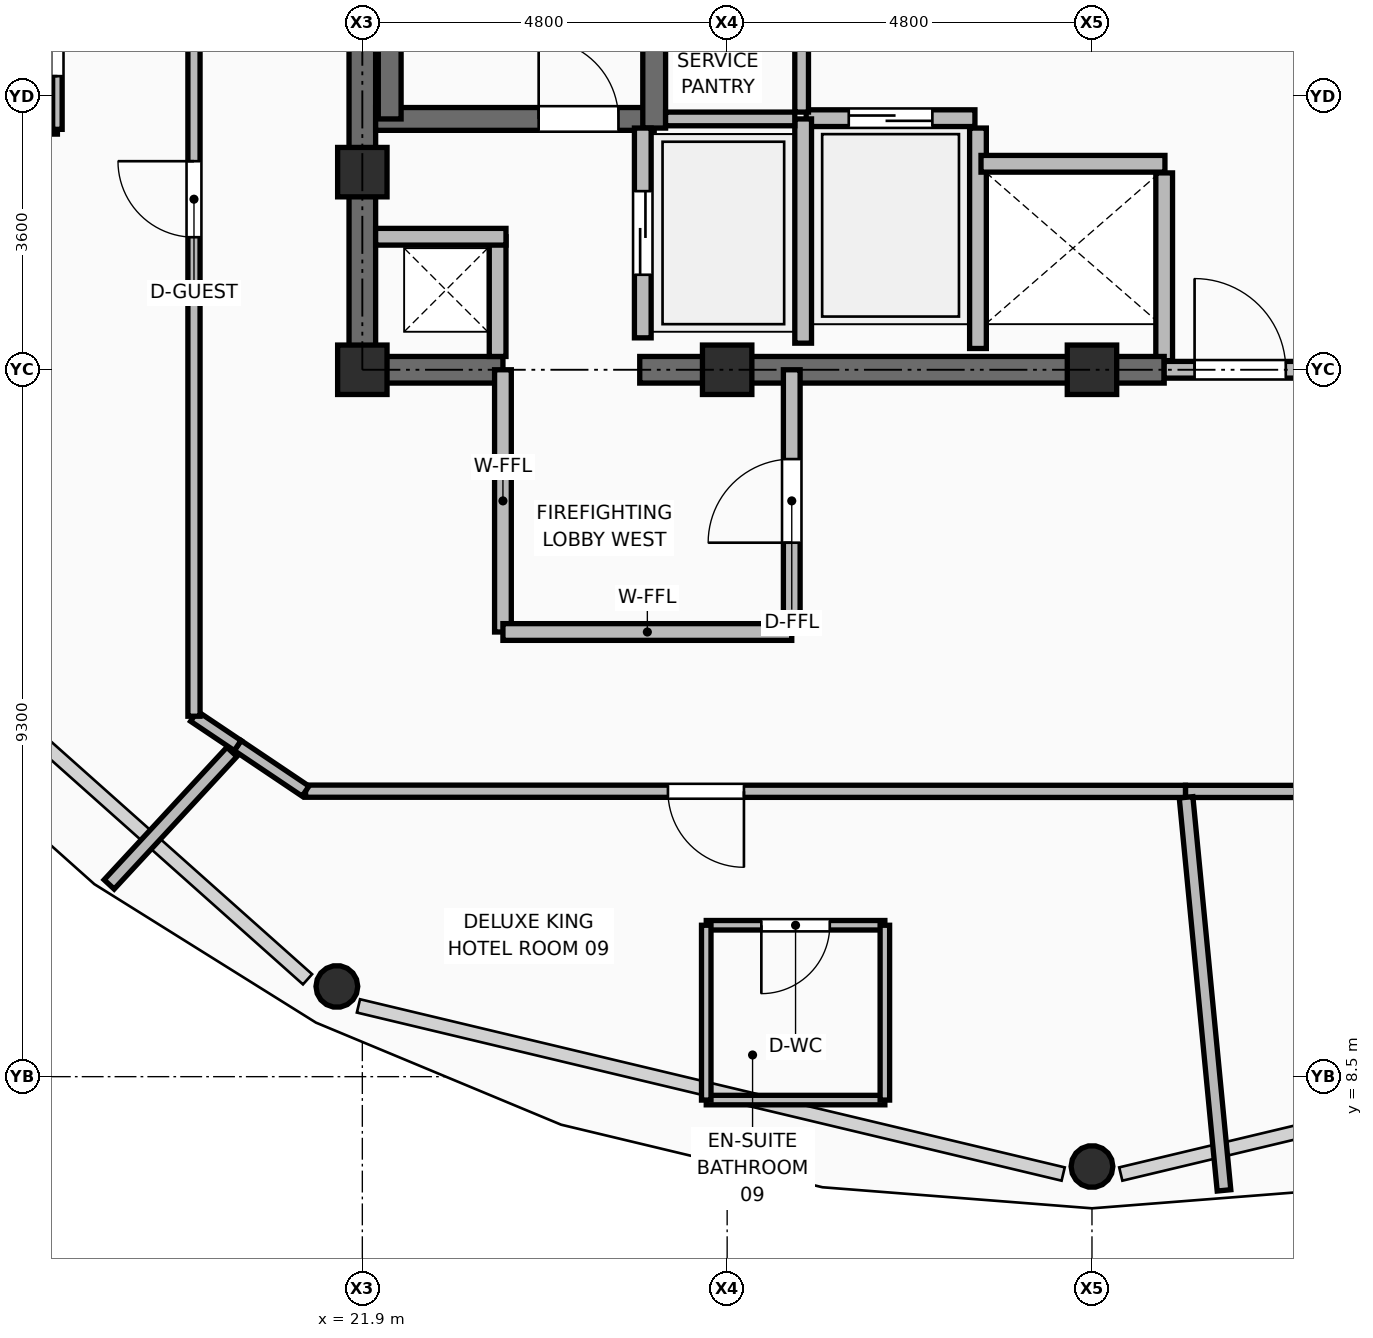
"""IFC4 building model, lengths in metres.
Left out: names, types, materials, properties, quantities, classifications, styles, units other than length and angle.
Written with IfcOpenShell. Run it as: python <this file> out.ifc"""

import sys

from ifc_helpers import new_model, si_unit, direction, frame, frame_2d, origin, origin_2d, place, context, subcontext, project, spatial, rectangle, hollow_circle, extrude, element, fill, save


model = new_model("IFC4")
c1 = context("Model", 3, precision=1e-05, world=origin(), true_north=direction((0.0, 1.0)))
c2 = subcontext(c1, "Body", "Model", "MODEL_VIEW")
j1 = project(units=[si_unit("LENGTHUNIT", "METRE"), si_unit("PLANEANGLEUNIT", "RADIAN")], contexts=[c1])
p1 = place(None, origin())
s1 = spatial("IfcSite", under=j1, at=p1, CompositionType="ELEMENT")
p2 = place(p1, origin())
s2 = spatial("IfcBuilding", under=s1, at=p2, CompositionType="ELEMENT")
p3 = place(p2, frame((0.0, 0.0, 263.85)))
s3 = spatial("IfcBuildingStorey", under=s2, at=p3, CompositionType="ELEMENT", Elevation=263.85)
for number, where, z_axis, x_axis in (
    (1, (21.9, 17.8, 0.0), (0.0, 0.0, 1.0), (1.0, 0.0, 0.0)),
    (2, (26.7, 17.8, 0.0), (0.0, 0.0, 1.0), (1.0, 0.0, 0.0)),
    (3, (31.5, 17.8, 0.0), (0.0, 0.0, 1.0), (1.0, 0.0, 0.0)),
    (4, (21.9, 20.4, 0.0), (0.0, 0.0, 1.0), (1.0, 0.0, 0.0)),
):
    element("IfcColumn", number, at=place(p3, frame(where, z_axis=z_axis, x_axis=x_axis)), inside=s3, PredefinedType="COLUMN", context=c2, shape_type="SweptSolid", body=[
        extrude(rectangle(XDim=0.65, YDim=0.65, at=origin_2d()), origin(), (0.0, 0.0, 1.0), 3.75),
    ])
for number, where, z_axis, x_axis in (
    (5, (21.565, 9.687, 0.0), (0.011, 0.017, 1.0), (-0.836, 0.549, 0.0)),
    (6, (31.5, 7.318, 0.0), (0.0, 0.02, 1.0), (-1.0, 0.0, 0.0)),
):
    element("IfcColumn", number, at=place(p3, frame(where, z_axis=z_axis, x_axis=x_axis)), inside=s3, PredefinedType="COLUMN", context=c2, shape_type="SweptSolid", body=[
        extrude(hollow_circle(Radius=0.275, WallThickness=0.025, at=origin_2d()), origin(), (0.0, 0.0, 1.0), 3.571),
    ])
p4 = place(p3, frame((30.0, 18.08, 0.0), z_axis=(0.0, 0.0, 1.0), x_axis=(0.0, 1.0, 0.0)))
e7 = element("IfcWall", 7, at=p4, inside=s3, PredefinedType="PARTITIONING", context=c2, shape_type="SweptSolid", body=[
    extrude(rectangle(XDim=2.9, YDim=0.22, at=frame_2d((1.45, 0.0))), origin(), (0.0, 0.0, 1.0), 3.545),
])
p5 = place(p3, frame((32.45, 17.92, 0.0), z_axis=(0.0, 0.0, 1.0), x_axis=(0.0, 1.0, 0.0)))
e8 = element("IfcWall", 8, at=p5, inside=s3, PredefinedType="PARTITIONING", context=c2, shape_type="SweptSolid", body=[
    extrude(rectangle(XDim=2.47, YDim=0.22, at=frame_2d((1.235, 0.0))), origin(), (0.0, 0.0, 1.0), 3.545),
])
p6 = place(p3, frame((21.725, 17.8, 0.0), z_axis=(0.0, 0.0, 1.0), x_axis=(1.0, 0.0, 0.0)))
e9 = element("IfcWall", 9, at=p6, inside=s3, PredefinedType="SHEAR", context=c2, shape_type="SweptSolid", body=[
    extrude(rectangle(XDim=2.025, YDim=0.35, at=frame_2d((1.012, 0.0))), origin(), (0.0, 0.0, 1.0), 3.57),
])
p7 = place(p3, frame((25.55, 17.8, 0.0), z_axis=(0.0, 0.0, 1.0), x_axis=(1.0, 0.0, 0.0)))
e10 = element("IfcWall", 10, at=p7, inside=s3, PredefinedType="SHEAR", context=c2, shape_type="SweptSolid", body=[
    extrude(rectangle(XDim=6.9, YDim=0.35, at=frame_2d((3.45, 0.0))), origin(), (0.0, 0.0, 1.0), 3.57),
])
p8 = place(p3, frame((32.45, 17.8, 0.0), z_axis=(0.0, 0.0, 1.0), x_axis=(1.0, 0.0, 0.0)))
e11 = element("IfcWall", 11, at=p8, inside=s3, PredefinedType="PARTITIONING", context=c2, shape_type="SweptSolid", body=[
    extrude(rectangle(XDim=2.5, YDim=0.22, at=frame_2d((1.25, 0.0))), origin(), (0.0, 0.0, 1.0), 3.132),
])
p9 = place(p8, frame((0.4, 0.0, 0.0)))
e12 = element("IfcOpeningElement", 12, at=p9, cuts=e11, PredefinedType="OPENING", context=c2, shape_type="SweptSolid", body=[
    extrude(rectangle(XDim=1.2, YDim=2.1, at=frame_2d((0.6, 1.05))), frame((0.0, 0.12, 0.0), z_axis=(0.0, -1.0, 0.0), x_axis=(1.0, 0.0, 0.0)), (0.0, 0.0, 1.0), 0.24),
])
p10 = place(p3, frame((21.9, 17.975, 0.0), z_axis=(0.0, 0.0, 1.0), x_axis=(0.0, 1.0, 0.0)))
e13 = element("IfcWall", 13, at=p10, inside=s3, PredefinedType="SHEAR", context=c2, shape_type="SweptSolid", body=[
    extrude(rectangle(XDim=14.3, YDim=0.35, at=frame_2d((7.15, 0.0))), origin(), (0.0, 0.0, 1.0), 3.57),
])
p11 = place(p3, frame((22.075, 21.1, 0.0), z_axis=(0.0, 0.0, 1.0), x_axis=(1.0, 0.0, 0.0)))
e14 = element("IfcWall", 14, at=p11, inside=s3, PredefinedType="SHEAR", context=c2, shape_type="SweptSolid", body=[
    extrude(rectangle(XDim=3.665, YDim=0.3, at=frame_2d((1.833, 0.0))), origin(), (0.0, 0.0, 1.0), 3.57),
])
p12 = place(p11, frame((2.145, 0.0, 0.0)))
e15 = element("IfcOpeningElement", 15, at=p12, cuts=e14, PredefinedType="OPENING", context=c2, shape_type="SweptSolid", body=[
    extrude(rectangle(XDim=1.05, YDim=2.1, at=frame_2d((0.525, 1.05))), frame((0.0, 0.16, 0.0), z_axis=(0.0, -1.0, 0.0), x_axis=(1.0, 0.0, 0.0)), (0.0, 0.0, 1.0), 0.32),
])
p13 = place(p3, frame((25.74, 20.98, 0.0), z_axis=(0.0, 0.0, 1.0), x_axis=(0.0, 1.0, 0.0)))
e16 = element("IfcWall", 16, at=p13, inside=s3, PredefinedType="SHEAR", context=c2, shape_type="SweptSolid", body=[
    extrude(rectangle(XDim=7.99, YDim=0.3, at=frame_2d((3.995, 0.0))), origin(), (0.0, 0.0, 1.0), 3.57),
])
p14 = place(p3, frame((22.26, 21.1, 0.0), z_axis=(0.0, 0.0, 1.0), x_axis=(0.0, 1.0, 0.0)))
e17 = element("IfcWall", 17, at=p14, inside=s3, PredefinedType="SHEAR", context=c2, shape_type="SweptSolid", body=[
    extrude(rectangle(XDim=7.75, YDim=0.3, at=frame_2d((3.875, 0.0))), origin(), (0.0, 0.0, 1.0), 3.57),
])
p15 = place(p3, frame((23.68, 17.975, 0.0), z_axis=(0.0, 0.0, 1.0), x_axis=(0.0, 1.0, 0.0)))
e18 = element("IfcWall", 18, at=p15, inside=s3, PredefinedType="PARTITIONING", context=c2, shape_type="SweptSolid", body=[
    extrude(rectangle(XDim=1.575, YDim=0.22, at=frame_2d((0.788, 0.0))), origin(), (0.0, 0.0, 1.0), 3.132),
])
p16 = place(p3, frame((22.075, 19.55, 0.0), z_axis=(0.0, 0.0, 1.0), x_axis=(1.0, 0.0, 0.0)))
e19 = element("IfcWall", 19, at=p16, inside=s3, PredefinedType="PARTITIONING", context=c2, shape_type="SweptSolid", body=[
    extrude(rectangle(XDim=1.715, YDim=0.22, at=frame_2d((0.857, 0.0))), origin(), (0.0, 0.0, 1.0), 2.595),
])
p17 = place(p3, frame((25.59, 18.22, 0.0), z_axis=(0.0, 0.0, 1.0), x_axis=(0.0, 1.0, 0.0)))
e20 = element("IfcWall", 20, at=p17, inside=s3, PredefinedType="PARTITIONING", context=c2, shape_type="SweptSolid", body=[
    extrude(rectangle(XDim=2.76, YDim=0.22, at=frame_2d((1.38, 0.0))), origin(), (0.0, 0.0, 1.0), 3.55),
])
p18 = place(p17, frame((0.83, 0.0, 0.0)))
e21 = element("IfcOpeningElement", 21, at=p18, cuts=e20, PredefinedType="OPENING", context=c2, shape_type="SweptSolid", body=[
    extrude(rectangle(XDim=1.1, YDim=2.2, at=frame_2d((0.55, 1.1))), frame((0.0, 0.12, 0.0), z_axis=(0.0, -1.0, 0.0), x_axis=(1.0, 0.0, 0.0)), (0.0, 0.0, 1.0), 0.24),
])
p19 = place(p3, frame((27.74, 21.11, 0.0), z_axis=(0.0, 0.0, 1.0), x_axis=(1.0, 0.0, 0.0)))
e22 = element("IfcWall", 22, at=p19, inside=s3, PredefinedType="PARTITIONING", context=c2, shape_type="SweptSolid", body=[
    extrude(rectangle(XDim=2.22, YDim=0.22, at=frame_2d((1.11, 0.0))), origin(), (0.0, 0.0, 1.0), 3.55),
])
p20 = place(p19, frame((0.56, 0.0, 0.0)))
e23 = element("IfcOpeningElement", 23, at=p20, cuts=e22, PredefinedType="OPENING", context=c2, shape_type="SweptSolid", body=[
    extrude(rectangle(XDim=1.1, YDim=2.2, at=frame_2d((0.55, 1.1))), frame((0.0, 0.12, 0.0), z_axis=(0.0, -1.0, 0.0), x_axis=(1.0, 0.0, 0.0)), (0.0, 0.0, 1.0), 0.24),
])
p21 = place(p3, frame((30.04, 20.51, 0.0), z_axis=(0.0, 0.0, 1.0), x_axis=(1.0, 0.0, 0.0)))
e24 = element("IfcWall", 24, at=p21, inside=s3, PredefinedType="PARTITIONING", context=c2, shape_type="SweptSolid", body=[
    extrude(rectangle(XDim=2.42, YDim=0.22, at=frame_2d((1.21, 0.0))), origin(), (0.0, 0.0, 1.0), 3.55),
])
p22 = place(p3, frame((27.7, 18.15, 0.0), z_axis=(0.0, 0.0, 1.0), x_axis=(0.0, 1.0, 0.0)))
e25 = element("IfcWall", 25, at=p22, inside=s3, PredefinedType="PARTITIONING", context=c2, shape_type="SweptSolid", body=[
    extrude(rectangle(XDim=2.95, YDim=0.22, at=frame_2d((1.475, 0.0))), origin(), (0.0, 0.0, 1.0), 3.55),
])
p23 = place(p3, frame((25.89, 21.1, 0.0), z_axis=(0.0, 0.0, 1.0), x_axis=(1.0, 0.0, 0.0)))
e26 = element("IfcWall", 26, at=p23, inside=s3, PredefinedType="PARTITIONING", context=c2, shape_type="SweptSolid", body=[
    extrude(rectangle(XDim=1.7, YDim=0.18, at=frame_2d((0.85, 0.0))), origin(), (0.0, 0.0, 1.0), 3.55),
])
p24 = place(p3, frame((27.68, 21.19, 0.0), z_axis=(0.0, 0.0, 1.0), x_axis=(0.0, 1.0, 0.0)))
e27 = element("IfcWall", 27, at=p24, inside=s3, PredefinedType="PARTITIONING", context=c2, shape_type="SweptSolid", body=[
    extrude(rectangle(XDim=4.37, YDim=0.18, at=frame_2d((2.185, 0.0))), origin(), (0.0, 0.0, 1.0), 3.55),
])
p25 = place(p24, frame((1.735, 0.0, 0.0)))
e28 = element("IfcOpeningElement", 28, at=p25, cuts=e27, PredefinedType="OPENING", context=c2, shape_type="SweptSolid", body=[
    extrude(rectangle(XDim=0.9, YDim=2.1, at=frame_2d((0.45, 1.05))), frame((0.0, 0.1, 0.0), z_axis=(0.0, -1.0, 0.0), x_axis=(1.0, 0.0, 0.0)), (0.0, 0.0, 1.0), 0.2),
])
p26 = place(p3, frame((23.75, 14.35, 0.0), z_axis=(0.0, 0.0, 1.0), x_axis=(0.0, 1.0, 0.0)))
e29 = element("IfcWall", 29, at=p26, inside=s3, PredefinedType="PARTITIONING", context=c2, shape_type="SweptSolid", body=[
    extrude(rectangle(XDim=3.45, YDim=0.22, at=frame_2d((1.725, 0.0))), origin(), (0.0, 0.0, 1.0), 3.132),
])
p27 = place(p3, frame((23.75, 14.35, 0.0), z_axis=(0.0, 0.0, 1.0), x_axis=(1.0, 0.0, 0.0)))
e30 = element("IfcWall", 30, at=p27, inside=s3, PredefinedType="PARTITIONING", context=c2, shape_type="SweptSolid", body=[
    extrude(rectangle(XDim=3.8, YDim=0.22, at=frame_2d((1.9, 0.0))), origin(), (0.0, 0.0, 1.0), 3.55),
])
p28 = place(p3, frame((27.55, 14.35, 0.0), z_axis=(0.0, 0.0, 1.0), x_axis=(0.0, 1.0, 0.0)))
e31 = element("IfcWall", 31, at=p28, inside=s3, PredefinedType="PARTITIONING", context=c2, shape_type="SweptSolid", body=[
    extrude(rectangle(XDim=3.45, YDim=0.22, at=frame_2d((1.725, 0.0))), origin(), (0.0, 0.0, 1.0), 3.132),
])
p29 = place(p28, frame((1.175, 0.0, 0.0)))
e32 = element("IfcOpeningElement", 32, at=p29, cuts=e31, PredefinedType="OPENING", context=c2, shape_type="SweptSolid", body=[
    extrude(rectangle(XDim=1.1, YDim=2.1, at=frame_2d((0.55, 1.05))), frame((0.0, 0.12, 0.0), z_axis=(0.0, -1.0, 0.0), x_axis=(1.0, 0.0, 0.0)), (0.0, 0.0, 1.0), 0.24),
])
p30 = place(p3, frame((41.825, 12.25, 0.0), z_axis=(0.0, 0.0, 1.0), x_axis=(-0.999999948119, 0.000322121692, 0.0)))
e33 = element("IfcWall", 33, at=p30, inside=s3, PredefinedType="PARTITIONING", context=c2, shape_type="SweptSolid", body=[
    extrude(rectangle(XDim=9.095, YDim=0.16, at=frame_2d((4.547, 0.0))), origin(), (0.0, 0.0, 1.0), 3.132),
])
p31 = place(p30, frame((2.388, 0.0, 0.0)))
e34 = element("IfcOpeningElement", 34, at=p31, cuts=e33, PredefinedType="OPENING", context=c2, shape_type="SweptSolid", body=[
    extrude(rectangle(XDim=1.2, YDim=2.1, at=frame_2d((0.6, 1.05))), frame((0.0, 0.09, 0.0), z_axis=(0.0, -1.0, 0.0), x_axis=(1.0, 0.0, 0.0)), (0.0, 0.0, 1.0), 0.18),
])
p32 = place(p3, frame((32.73, 12.253, 0.0), z_axis=(0.0, 0.0, 1.0), x_axis=(-0.99999996242, 0.000274151701, 0.0)))
e35 = element("IfcWall", 35, at=p32, inside=s3, PredefinedType="PARTITIONING", context=c2, shape_type="SweptSolid", body=[
    extrude(rectangle(XDim=11.577, YDim=0.16, at=frame_2d((5.789, 0.0))), origin(), (0.0, 0.0, 1.0), 3.132),
])
p33 = place(p32, frame((5.809, 0.0, 0.0)))
e36 = element("IfcOpeningElement", 36, at=p33, cuts=e35, PredefinedType="OPENING", context=c2, shape_type="SweptSolid", body=[
    extrude(rectangle(XDim=1.0, YDim=2.1, at=frame_2d((0.5, 1.05))), frame((0.0, 0.09, 0.0), z_axis=(0.0, -1.0, 0.0), x_axis=(1.0, 0.0, 0.0)), (0.0, 0.0, 1.0), 0.18),
])
p34 = place(p3, frame((21.153, 12.256, 0.0), z_axis=(0.0, 0.0, 1.0), x_axis=(-0.830125096925, 0.557577190581, 0.0)))
e37 = element("IfcWall", 37, at=p34, inside=s3, PredefinedType="PARTITIONING", context=c2, shape_type="SweptSolid", body=[
    extrude(rectangle(XDim=1.076, YDim=0.16, at=frame_2d((0.538, 0.0))), origin(), (0.0, 0.0, 1.0), 3.55),
])
p35 = place(p3, frame((20.26, 12.856, 0.0), z_axis=(0.0, 0.0, 1.0), x_axis=(-0.8302560917, 0.557382115065, 0.0)))
e38 = element("IfcWall", 38, at=p35, inside=s3, PredefinedType="PARTITIONING", context=c2, shape_type="SweptSolid", body=[
    extrude(rectangle(XDim=0.692, YDim=0.16, at=frame_2d((0.346, 0.0))), origin(), (0.0, 0.0, 1.0), 3.55),
])
p36 = place(p3, frame((19.685, 13.242, 0.0), z_axis=(0.0, 0.0, 1.0), x_axis=(0.0, 1.0, 0.0)))
e39 = element("IfcWall", 39, at=p36, inside=s3, PredefinedType="PARTITIONING", context=c2, shape_type="SweptSolid", body=[
    extrude(rectangle(XDim=10.608, YDim=0.16, at=frame_2d((5.304, 0.0))), origin(), (0.0, 0.0, 1.0), 3.132),
])
p37 = place(p36, frame((6.302, 0.0, 0.0)))
e40 = element("IfcOpeningElement", 40, at=p37, cuts=e39, PredefinedType="OPENING", context=c2, shape_type="SweptSolid", body=[
    extrude(rectangle(XDim=1.0, YDim=2.1, at=frame_2d((0.5, 1.05))), frame((0.0, 0.09, 0.0), z_axis=(0.0, -1.0, 0.0), x_axis=(1.0, 0.0, 0.0)), (0.0, 0.0, 1.0), 0.18),
])
p38 = place(p3, frame((20.184, 12.773, 0.0), z_axis=(0.0, 0.0, 1.0), x_axis=(-0.679469476933, -0.733703775318, 0.0)))
e41 = element("IfcWall", 41, at=p38, inside=s3, PredefinedType="PARTITIONING", context=c2, shape_type="SweptSolid", body=[
    extrude(rectangle(XDim=2.377, YDim=0.18, at=frame_2d((1.188, 0.0))), origin(), (0.0, 0.0, 1.0), 3.003),
])
p39 = place(p3, frame((32.738, 12.175, 0.0), z_axis=(0.0, 0.0, 1.0), x_axis=(0.096055357657, -0.995375993414, 0.0)))
e42 = element("IfcWall", 42, at=p39, inside=s3, PredefinedType="PARTITIONING", context=c2, shape_type="SweptSolid", body=[
    extrude(rectangle(XDim=5.195, YDim=0.18, at=frame_2d((2.598, 0.0))), origin(), (0.0, 0.0, 1.0), 3.003),
])
p40 = place(p3, frame((15.538, 20.963, 0.0), z_axis=(0.0, 0.0, 1.0), x_axis=(1.0, 0.0, 0.0)))
e43 = element("IfcWall", 43, at=p40, inside=s3, PredefinedType="PARTITIONING", context=c2, shape_type="SweptSolid", body=[
    extrude(rectangle(XDim=2.35, YDim=0.125, at=frame_2d((1.175, 0.0))), origin(), (0.0, 0.0, 1.0), 3.55),
])
p41 = place(p3, frame((17.888, 20.963, 0.0), z_axis=(0.0, 0.0, 1.0), x_axis=(0.0, 1.0, 0.0)))
e44 = element("IfcWall", 44, at=p41, inside=s3, PredefinedType="PARTITIONING", context=c2, shape_type="SweptSolid", body=[
    extrude(rectangle(XDim=2.3, YDim=0.125, at=frame_2d((1.15, 0.0))), origin(), (0.0, 0.0, 1.0), 3.132),
])
p42 = place(p41, frame((0.7, 0.0, 0.0)))
e45 = element("IfcOpeningElement", 45, at=p42, cuts=e44, PredefinedType="OPENING", context=c2, shape_type="SweptSolid", body=[
    extrude(rectangle(XDim=0.9, YDim=2.1, at=frame_2d((0.45, 1.05))), frame((0.0, 0.073, 0.0), z_axis=(0.0, -1.0, 0.0), x_axis=(1.0, 0.0, 0.0)), (0.0, 0.0, 1.0), 0.145),
])
p43 = place(p3, frame((26.425, 8.192, 0.0), z_axis=(0.0, 0.0, 1.0), x_axis=(1.0, 0.0, 0.0)))
e46 = element("IfcWall", 46, at=p43, inside=s3, PredefinedType="PARTITIONING", context=c2, shape_type="SweptSolid", body=[
    extrude(rectangle(XDim=2.35, YDim=0.125, at=frame_2d((1.175, 0.0))), origin(), (0.0, 0.0, 1.0), 3.003),
])
p44 = place(p3, frame((26.425, 10.492, 0.0), z_axis=(0.0, 0.0, 1.0), x_axis=(1.0, 0.0, 0.0)))
e47 = element("IfcWall", 47, at=p44, inside=s3, PredefinedType="PARTITIONING", context=c2, shape_type="SweptSolid", body=[
    extrude(rectangle(XDim=2.35, YDim=0.125, at=frame_2d((1.175, 0.0))), origin(), (0.0, 0.0, 1.0), 3.55),
])
p45 = place(p44, frame((0.725, 0.0, 0.0)))
e48 = element("IfcOpeningElement", 48, at=p45, cuts=e47, PredefinedType="OPENING", context=c2, shape_type="SweptSolid", body=[
    extrude(rectangle(XDim=0.9, YDim=2.1, at=frame_2d((0.45, 1.05))), frame((0.0, 0.073, 0.0), z_axis=(0.0, -1.0, 0.0), x_axis=(1.0, 0.0, 0.0)), (0.0, 0.0, 1.0), 0.145),
])
for number, where, z_axis, x_axis in (
    (49, (26.425, 8.192, 0.0), (0.0, 0.0, 1.0), (0.0, 1.0, 0.0)),
    (50, (28.775, 8.192, 0.0), (0.0, 0.0, 1.0), (0.0, 1.0, 0.0)),
):
    element("IfcWall", number, at=place(p3, frame(where, z_axis=z_axis, x_axis=x_axis)), inside=s3, PredefinedType="PARTITIONING", context=c2, shape_type="SweptSolid", body=[
        extrude(rectangle(XDim=2.3, YDim=0.125, at=frame_2d((1.15, 0.0))), origin(), (0.0, 0.0, 1.0), 3.003),
    ])
p46 = place(p9, origin())
e51 = element("IfcDoor", 51, at=p46, inside=s3, OperationType="SINGLE_SWING_LEFT", PredefinedType="DOOR", context=c2, shape_type="SweptSolid", body=[
    extrude(rectangle(XDim=1.2, YDim=2.1, at=frame_2d((0.6, 1.05))), frame((0.0, 0.025, 0.0), z_axis=(0.0, -1.0, 0.0), x_axis=(1.0, 0.0, 0.0)), (0.0, 0.0, 1.0), 0.05),
])
fill(e12, e51)
p47 = place(p12, origin())
e52 = element("IfcDoor", 52, at=p47, inside=s3, OperationType="SINGLE_SWING_LEFT", PredefinedType="DOOR", context=c2, shape_type="SweptSolid", body=[
    extrude(rectangle(XDim=1.05, YDim=2.1, at=frame_2d((0.525, 1.05))), frame((0.0, 0.025, 0.0), z_axis=(0.0, -1.0, 0.0), x_axis=(1.0, 0.0, 0.0)), (0.0, 0.0, 1.0), 0.05),
])
fill(e15, e52)
p48 = place(p18, origin())
e53 = element("IfcDoor", 53, at=p48, inside=s3, OperationType="DOUBLE_DOOR_SLIDING", PredefinedType="DOOR", context=c2, shape_type="SweptSolid", body=[
    extrude(rectangle(XDim=1.1, YDim=2.2, at=frame_2d((0.55, 1.1))), frame((0.0, 0.025, 0.0), z_axis=(0.0, -1.0, 0.0), x_axis=(1.0, 0.0, 0.0)), (0.0, 0.0, 1.0), 0.05),
])
fill(e21, e53)
p49 = place(p20, origin())
e54 = element("IfcDoor", 54, at=p49, inside=s3, OperationType="DOUBLE_DOOR_SLIDING", PredefinedType="DOOR", context=c2, shape_type="SweptSolid", body=[
    extrude(rectangle(XDim=1.1, YDim=2.2, at=frame_2d((0.55, 1.1))), frame((0.0, 0.025, 0.0), z_axis=(0.0, -1.0, 0.0), x_axis=(1.0, 0.0, 0.0)), (0.0, 0.0, 1.0), 0.05),
])
fill(e23, e54)
p50 = place(p29, origin())
e55 = element("IfcDoor", 55, at=p50, inside=s3, OperationType="SINGLE_SWING_LEFT", PredefinedType="DOOR", context=c2, shape_type="SweptSolid", body=[
    extrude(rectangle(XDim=1.1, YDim=2.1, at=frame_2d((0.55, 1.05))), frame((0.0, 0.025, 0.0), z_axis=(0.0, -1.0, 0.0), x_axis=(1.0, 0.0, 0.0)), (0.0, 0.0, 1.0), 0.05),
])
fill(e32, e55)
p51 = place(p42, origin())
e56 = element("IfcDoor", 56, at=p51, inside=s3, OperationType="SINGLE_SWING_LEFT", PredefinedType="DOOR", context=c2, shape_type="SweptSolid", body=[
    extrude(rectangle(XDim=0.9, YDim=2.1, at=frame_2d((0.45, 1.05))), frame((0.0, 0.025, 0.0), z_axis=(0.0, -1.0, 0.0), x_axis=(1.0, 0.0, 0.0)), (0.0, 0.0, 1.0), 0.05),
])
fill(e45, e56)
p52 = place(p37, origin())
e57 = element("IfcDoor", 57, at=p52, inside=s3, OperationType="SINGLE_SWING_RIGHT", PredefinedType="DOOR", context=c2, shape_type="SweptSolid", body=[
    extrude(rectangle(XDim=1.0, YDim=2.1, at=frame_2d((0.5, 1.05))), frame((0.0, 0.025, 0.0), z_axis=(0.0, -1.0, 0.0), x_axis=(1.0, 0.0, 0.0)), (0.0, 0.0, 1.0), 0.05),
])
fill(e40, e57)
p53 = place(p45, frame((0.9, 0.0, 0.0), z_axis=(0.0, 0.0, 1.0), x_axis=(-1.0, 0.0, 0.0)))
e58 = element("IfcDoor", 58, at=p53, inside=s3, OperationType="SINGLE_SWING_RIGHT", PredefinedType="DOOR", context=c2, shape_type="SweptSolid", body=[
    extrude(rectangle(XDim=0.9, YDim=2.1, at=frame_2d((0.45, 1.05))), frame((0.0, 0.025, 0.0), z_axis=(0.0, -1.0, 0.0), x_axis=(1.0, 0.0, 0.0)), (0.0, 0.0, 1.0), 0.05),
])
fill(e48, e58)
p54 = place(p33, origin())
e59 = element("IfcDoor", 59, at=p54, inside=s3, OperationType="SINGLE_SWING_LEFT", PredefinedType="DOOR", context=c2, shape_type="SweptSolid", body=[
    extrude(rectangle(XDim=1.0, YDim=2.1, at=frame_2d((0.5, 1.05))), frame((0.0, 0.025, 0.0), z_axis=(0.0, -1.0, 0.0), x_axis=(1.0, 0.0, 0.0)), (0.0, 0.0, 1.0), 0.05),
])
fill(e36, e59)
save(model, sys.argv[1])
